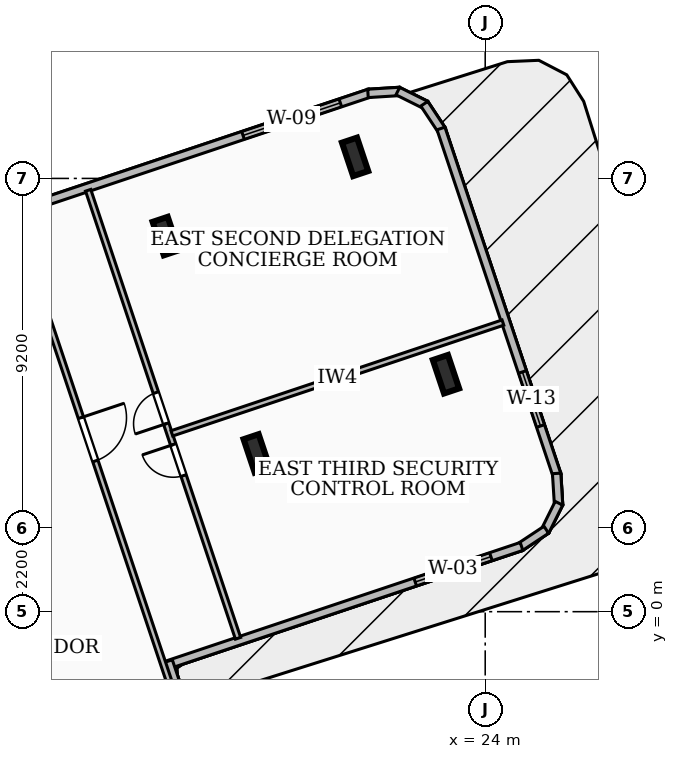
"""IFC4 building model, lengths in metres.
Left out: names, types, materials, properties, quantities, classifications, styles, units other than length and angle.
Written with IfcOpenShell. Run it as: python <this file> out.ifc"""

import sys

from ifc_helpers import new_model, si_unit, direction, frame, frame_2d, origin, origin_2d, place, context, subcontext, project, spatial, rectangle, i_section, extrude, element, fill, save


model = new_model("IFC4")
c1 = context("Model", 3, precision=1e-05, world=origin(), true_north=direction((0.0, 1.0)))
c2 = subcontext(c1, "Body", "Model", "MODEL_VIEW")
j1 = project(units=[si_unit("LENGTHUNIT", "METRE"), si_unit("PLANEANGLEUNIT", "RADIAN")], contexts=[c1])
p1 = place(None, origin())
s1 = spatial("IfcSite", under=j1, at=p1, CompositionType="ELEMENT")
p2 = place(p1, origin())
s2 = spatial("IfcBuilding", under=s1, at=p2, CompositionType="ELEMENT")
p3 = place(p2, frame((0.0, 0.0, 155.88)))
s3 = spatial("IfcBuildingStorey", under=s2, at=p3, CompositionType="ELEMENT", Elevation=155.88)
for number, where, z_axis, x_axis in (
    (1, (17.987, 4.164, 0.0), (0.0, 0.0, 1.0), (0.948, 0.317, 0.0)),
    (2, (15.594, 9.883, 0.0), (0.0, 0.0, 1.0), (0.948, 0.317, 0.0)),
    (3, (22.968, 6.248, 0.0), (0.0, 0.0, 1.0), (0.948, 0.317, 0.0)),
    (4, (20.576, 11.967, 0.0), (0.0, 0.0, 1.0), (0.948, 0.317, 0.0)),
):
    element("IfcColumn", number, at=place(p3, frame(where, z_axis=z_axis, x_axis=x_axis)), inside=s3, PredefinedType="COLUMN", context=c2, shape_type="SweptSolid", body=[
        extrude(i_section(OverallWidth=0.418, OverallDepth=0.927, WebThickness=0.019, FlangeThickness=0.032, at=origin_2d()), origin(), (0.0, 0.0, 1.0), 3.6),
    ])
p4 = place(p3, frame((11.615, 10.519, 0.0), z_axis=(0.0, 0.0, 1.0), x_axis=(0.948331055834, 0.317282537404, 0.0)))
e5 = element("IfcWall", 5, at=p4, inside=s3, PredefinedType="SOLIDWALL", context=c2, shape_type="SweptSolid", body=[
    extrude(rectangle(XDim=9.858, YDim=0.22, at=frame_2d((4.929, 0.0))), origin(), (0.0, 0.0, 1.0), 3.34),
])
p5 = place(p4, frame((6.34, 0.0, 0.85)))
e6 = element("IfcOpeningElement", 6, at=p5, cuts=e5, PredefinedType="OPENING", context=c2, shape_type="SweptSolid", body=[
    extrude(rectangle(XDim=2.7, YDim=1.65, at=frame_2d((1.35, 0.825))), frame((0.0, 0.12, 0.0), z_axis=(0.0, -1.0, 0.0), x_axis=(1.0, 0.0, 0.0)), (0.0, 0.0, 1.0), 0.24),
])
p6 = place(p3, frame((20.915, 13.637, 0.0), z_axis=(0.0, 0.0, 1.0), x_axis=(0.998057128569, 0.062305442082, 0.0)))
e7 = element("IfcWall", 7, at=p6, inside=s3, PredefinedType="SOLIDWALL", context=c2, shape_type="SweptSolid", body=[
    extrude(rectangle(XDim=0.835, YDim=0.22, at=frame_2d((0.417, 0.0))), origin(), (0.0, 0.0, 1.0), 3.34),
])
p7 = place(p3, frame((21.701, 13.698, 0.0), z_axis=(0.0, 0.0, 1.0), x_axis=(0.894963703084, -0.446138958356, 0.0)))
e8 = element("IfcWall", 8, at=p7, inside=s3, PredefinedType="SOLIDWALL", context=c2, shape_type="SweptSolid", body=[
    extrude(rectangle(XDim=0.818, YDim=0.22, at=frame_2d((0.409, 0.0))), origin(), (0.0, 0.0, 1.0), 3.34),
])
p8 = place(p3, frame((22.397, 13.365, 0.0), z_axis=(0.0, 0.0, 1.0), x_axis=(0.552133058206, -0.833756011094, 0.0)))
e9 = element("IfcWall", 9, at=p8, inside=s3, PredefinedType="SOLIDWALL", context=c2, shape_type="SweptSolid", body=[
    extrude(rectangle(XDim=0.835, YDim=0.22, at=frame_2d((0.417, 0.0))), origin(), (0.0, 0.0, 1.0), 3.34),
])
p9 = place(p3, frame((22.836, 12.714, 0.0), z_axis=(0.0, 0.0, 1.0), x_axis=(0.317285610931, -0.94833002752, 0.0)))
e10 = element("IfcWall", 10, at=p9, inside=s3, PredefinedType="SOLIDWALL", context=c2, shape_type="SweptSolid", body=[
    extrude(rectangle(XDim=9.622, YDim=0.22, at=frame_2d((4.811, 0.0))), origin(), (0.0, 0.0, 1.0), 3.34),
])
p10 = place(p9, frame((6.755, 0.0, 0.85)))
e11 = element("IfcOpeningElement", 11, at=p10, cuts=e10, PredefinedType="OPENING", context=c2, shape_type="SweptSolid", body=[
    extrude(rectangle(XDim=1.5, YDim=1.8, at=frame_2d((0.75, 0.9))), frame((0.0, 0.12, 0.0), z_axis=(0.0, -1.0, 0.0), x_axis=(1.0, 0.0, 0.0)), (0.0, 0.0, 1.0), 0.24),
])
p11 = place(p3, frame((25.879, 3.638, 0.0), z_axis=(0.0, 0.0, 1.0), x_axis=(0.062378286155, -0.998052578483, 0.0)))
e12 = element("IfcWall", 12, at=p11, inside=s3, PredefinedType="SOLIDWALL", context=c2, shape_type="SweptSolid", body=[
    extrude(rectangle(XDim=0.834, YDim=0.22, at=frame_2d((0.417, 0.0))), origin(), (0.0, 0.0, 1.0), 3.34),
])
p12 = place(p3, frame((25.94, 2.853, 0.0), z_axis=(0.0, 0.0, 1.0), x_axis=(-0.445781750405, -0.895141682085, 0.0)))
e13 = element("IfcWall", 13, at=p12, inside=s3, PredefinedType="SOLIDWALL", context=c2, shape_type="SweptSolid", body=[
    extrude(rectangle(XDim=0.819, YDim=0.22, at=frame_2d((0.409, 0.0))), origin(), (0.0, 0.0, 1.0), 3.34),
])
p13 = place(p3, frame((25.607, 2.156, 0.0), z_axis=(0.0, 0.0, 1.0), x_axis=(-0.833756011094, -0.552133058206, 0.0)))
e14 = element("IfcWall", 14, at=p13, inside=s3, PredefinedType="SOLIDWALL", context=c2, shape_type="SweptSolid", body=[
    extrude(rectangle(XDim=0.835, YDim=0.22, at=frame_2d((0.417, 0.0))), origin(), (0.0, 0.0, 1.0), 3.34),
])
p14 = place(p3, frame((24.956, 1.717, 0.0), z_axis=(0.0, 0.0, 1.0), x_axis=(-0.948331055834, -0.317282537404, 0.0)))
e15 = element("IfcWall", 15, at=p14, inside=s3, PredefinedType="SOLIDWALL", context=c2, shape_type="SweptSolid", body=[
    extrude(rectangle(XDim=9.858, YDim=0.22, at=frame_2d((4.929, 0.0))), origin(), (0.0, 0.0, 1.0), 3.34),
])
p15 = place(p14, frame((0.85, 0.0, 0.85)))
e16 = element("IfcOpeningElement", 16, at=p15, cuts=e15, PredefinedType="OPENING", context=c2, shape_type="SweptSolid", body=[
    extrude(rectangle(XDim=2.1, YDim=2.0, at=frame_2d((1.05, 1.0))), frame((0.0, 0.12, 0.0), z_axis=(0.0, -1.0, 0.0), x_axis=(1.0, 0.0, 0.0)), (0.0, 0.0, 1.0), 0.24),
])
p16 = place(p3, frame((15.662, -1.3, 0.0), z_axis=(0.0, 0.0, 1.0), x_axis=(0.317224676093, -0.948350412494, 0.0)))
e17 = element("IfcWall", 17, at=p16, inside=s3, PredefinedType="SOLIDWALL", context=c2, shape_type="SweptSolid", body=[
    extrude(rectangle(XDim=6.758, YDim=0.22, at=frame_2d((3.379, 0.0))), origin(), (0.0, 0.0, 1.0), 3.34),
])
p17 = place(p3, frame((10.372, 14.037, 0.0), z_axis=(0.0, 0.0, 1.0), x_axis=(0.317298382655, -0.94832575435, 0.0)))
e18 = element("IfcWall", 18, at=p17, inside=s3, PredefinedType="PARTITIONING", context=c2, shape_type="SweptSolid", body=[
    extrude(rectangle(XDim=20.041, YDim=0.145, at=frame_2d((10.021, 0.0))), origin(), (0.0, 0.0, 1.0), 2.644),
])
p18 = place(p17, frame((9.42, 0.0, 0.0)))
e19 = element("IfcOpeningElement", 19, at=p18, cuts=e18, PredefinedType="OPENING", context=c2, shape_type="SweptSolid", body=[
    extrude(rectangle(XDim=1.2, YDim=2.1, at=frame_2d((0.6, 1.05))), frame((0.0, 0.083, 0.0), z_axis=(0.0, -1.0, 0.0), x_axis=(1.0, 0.0, 0.0)), (0.0, 0.0, 1.0), 0.165),
])
p19 = place(p3, frame((15.755, 4.692, 0.0), z_axis=(0.0, 0.0, 1.0), x_axis=(0.94831322287, 0.317335833667, 0.0)))
e20 = element("IfcWall", 20, at=p19, inside=s3, PredefinedType="PARTITIONING", context=c2, shape_type="SweptSolid", body=[
    extrude(rectangle(XDim=9.186, YDim=0.145, at=frame_2d((4.593, 0.0))), origin(), (0.0, 0.0, 1.0), 2.793),
])
p20 = place(p3, frame((17.496, -0.7, 0.0), z_axis=(0.0, 0.0, 1.0), x_axis=(-0.317299961245, 0.948325226172, 0.0)))
e21 = element("IfcWall", 21, at=p20, inside=s3, PredefinedType="PARTITIONING", context=c2, shape_type="SweptSolid", body=[
    extrude(rectangle(XDim=12.43, YDim=0.145, at=frame_2d((6.215, 0.0))), origin(), (0.0, 0.0, 1.0), 2.644),
])
p21 = place(p20, frame((4.515, 0.0, 0.0)))
e22 = element("IfcOpeningElement", 22, at=p21, cuts=e21, PredefinedType="OPENING", context=c2, shape_type="SweptSolid", body=[
    extrude(rectangle(XDim=0.86, YDim=2.04, at=frame_2d((0.43, 1.02))), frame((0.0, 0.083, 0.0), z_axis=(0.0, -1.0, 0.0), x_axis=(1.0, 0.0, 0.0)), (0.0, 0.0, 1.0), 0.165),
])
p22 = place(p20, frame((5.955, 0.0, 0.0)))
e23 = element("IfcOpeningElement", 23, at=p22, cuts=e21, PredefinedType="OPENING", context=c2, shape_type="SweptSolid", body=[
    extrude(rectangle(XDim=0.86, YDim=2.04, at=frame_2d((0.43, 1.02))), frame((0.0, 0.083, 0.0), z_axis=(0.0, -1.0, 0.0), x_axis=(1.0, 0.0, 0.0)), (0.0, 0.0, 1.0), 0.165),
])
p23 = place(p5, origin())
e24 = element("IfcWindow", 24, at=p23, inside=s3, PartitioningType="SINGLE_PANEL", PredefinedType="WINDOW", context=c2, shape_type="SweptSolid", body=[
    extrude(rectangle(XDim=2.7, YDim=1.65, at=frame_2d((1.35, 0.825))), frame((0.0, 0.03, 0.0), z_axis=(0.0, -1.0, 0.0), x_axis=(1.0, 0.0, 0.0)), (0.0, 0.0, 1.0), 0.06),
])
fill(e6, e24)
p24 = place(p10, origin())
e25 = element("IfcWindow", 25, at=p24, inside=s3, PartitioningType="SINGLE_PANEL", PredefinedType="WINDOW", context=c2, shape_type="SweptSolid", body=[
    extrude(rectangle(XDim=1.5, YDim=1.8, at=frame_2d((0.75, 0.9))), frame((0.0, 0.03, 0.0), z_axis=(0.0, -1.0, 0.0), x_axis=(1.0, 0.0, 0.0)), (0.0, 0.0, 1.0), 0.06),
])
fill(e11, e25)
p25 = place(p15, origin())
e26 = element("IfcWindow", 26, at=p25, inside=s3, PartitioningType="SINGLE_PANEL", PredefinedType="WINDOW", context=c2, shape_type="SweptSolid", body=[
    extrude(rectangle(XDim=2.1, YDim=2.0, at=frame_2d((1.05, 1.0))), frame((0.0, 0.03, 0.0), z_axis=(0.0, -1.0, 0.0), x_axis=(1.0, 0.0, 0.0)), (0.0, 0.0, 1.0), 0.06),
])
fill(e16, e26)
p26 = place(p18, origin())
e27 = element("IfcDoor", 27, at=p26, inside=s3, OperationType="SINGLE_SWING_LEFT", PredefinedType="DOOR", context=c2, shape_type="SweptSolid", body=[
    extrude(rectangle(XDim=1.2, YDim=2.1, at=frame_2d((0.6, 1.05))), frame((0.0, 0.025, 0.0), z_axis=(0.0, -1.0, 0.0), x_axis=(1.0, 0.0, 0.0)), (0.0, 0.0, 1.0), 0.05),
])
fill(e19, e27)
p27 = place(p21, origin())
e28 = element("IfcDoor", 28, at=p27, inside=s3, OperationType="SINGLE_SWING_RIGHT", PredefinedType="DOOR", context=c2, shape_type="SweptSolid", body=[
    extrude(rectangle(XDim=0.86, YDim=2.04, at=frame_2d((0.43, 1.02))), frame((0.0, 0.025, 0.0), z_axis=(0.0, -1.0, 0.0), x_axis=(1.0, 0.0, 0.0)), (0.0, 0.0, 1.0), 0.05),
])
fill(e22, e28)
p28 = place(p22, origin())
e29 = element("IfcDoor", 29, at=p28, inside=s3, OperationType="SINGLE_SWING_LEFT", PredefinedType="DOOR", context=c2, shape_type="SweptSolid", body=[
    extrude(rectangle(XDim=0.86, YDim=2.04, at=frame_2d((0.43, 1.02))), frame((0.0, 0.025, 0.0), z_axis=(0.0, -1.0, 0.0), x_axis=(1.0, 0.0, 0.0)), (0.0, 0.0, 1.0), 0.05),
])
fill(e23, e29)
save(model, sys.argv[1])
